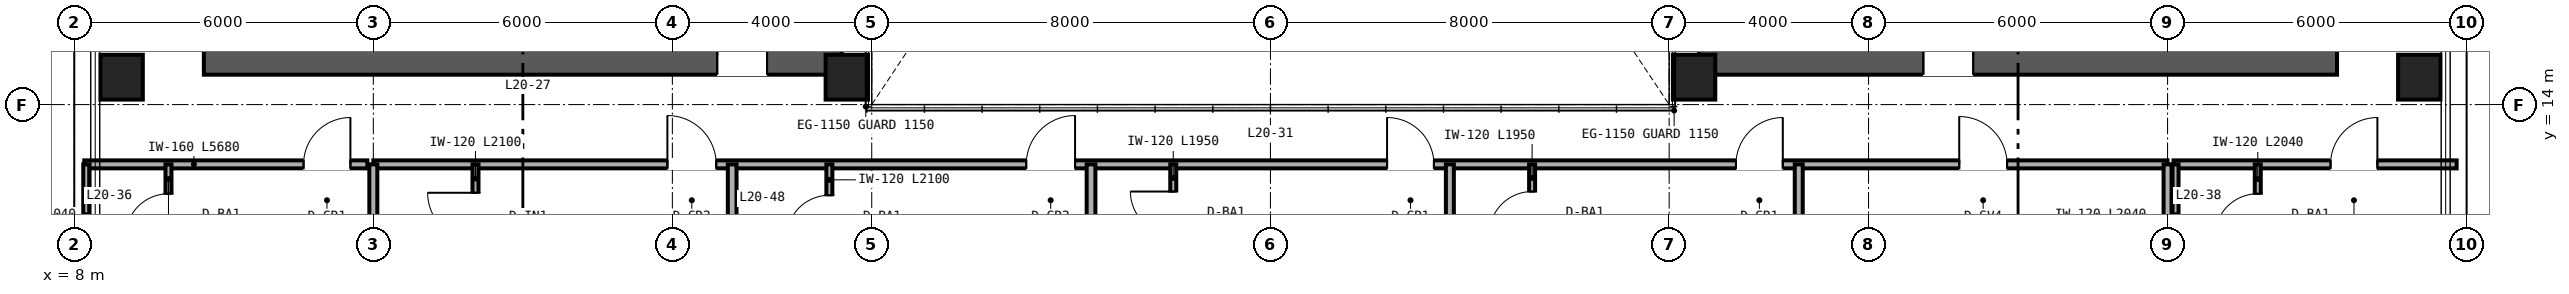
"""IFC4 building model, lengths in metres.
Left out: names, types, materials, properties, quantities, classifications, styles, units other than length and angle.
Written with IfcOpenShell. Run it as: python <this file> out.ifc"""

import sys

from ifc_helpers import new_model, si_unit, direction, frame, frame_2d, origin, origin_2d, place, context, subcontext, project, spatial, rectangle, hollow_rectangle, extrude, source, transform, mapped, element, fill, save


model = new_model("IFC4")
c1 = context("Model", 3, precision=1e-05, world=origin(), true_north=direction((0.0, 1.0)))
c2 = subcontext(c1, "Body", "Model", "MODEL_VIEW")
j1 = project(units=[si_unit("LENGTHUNIT", "METRE"), si_unit("PLANEANGLEUNIT", "RADIAN")], contexts=[c1])
p1 = place(None, origin())
s1 = spatial("IfcSite", under=j1, at=p1, CompositionType="ELEMENT")
p2 = place(p1, origin())
s2 = spatial("IfcBuilding", under=s1, at=p2, CompositionType="ELEMENT")
p3 = place(p2, frame((0.0, 0.0, 81.6)))
s3 = spatial("IfcBuildingStorey", under=s2, at=p3, CompositionType="ELEMENT", Elevation=81.6)
p4 = place(p3, frame((10.6, 15.0, 0.0), z_axis=(0.0, 0.0, 1.0), x_axis=(1.0, 0.0, 0.0)))
e1 = element("IfcWall", 1, at=p4, inside=s3, PredefinedType="SHEAR", context=c2, shape_type="SweptSolid", body=[
    extrude(rectangle(XDim=12.8, YDim=0.8, at=frame_2d((6.4, 0.0))), origin(), (0.0, 0.0, 1.0), 3.28),
])
p5 = place(p4, frame((10.3, 0.0, 0.0)))
e2 = element("IfcOpeningElement", 2, at=p5, cuts=e1, PredefinedType="OPENING", context=c2, shape_type="SweptSolid", body=[
    extrude(rectangle(XDim=1.0, YDim=2.15, at=frame_2d((0.5, 1.075))), frame((0.0, 0.41, 0.0), z_axis=(0.0, -1.0, 0.0), x_axis=(1.0, 0.0, 0.0)), (0.0, 0.0, 1.0), 0.82),
])
p6 = place(p3, frame((40.6, 15.0, 0.0), z_axis=(0.0, 0.0, 1.0), x_axis=(1.0, 0.0, 0.0)))
e3 = element("IfcWall", 3, at=p6, inside=s3, PredefinedType="SHEAR", context=c2, shape_type="SweptSolid", body=[
    extrude(rectangle(XDim=12.8, YDim=0.8, at=frame_2d((6.4, 0.0))), origin(), (0.0, 0.0, 1.0), 3.28),
])
p7 = place(p6, frame((4.5, 0.0, 0.0)))
e4 = element("IfcOpeningElement", 4, at=p7, cuts=e3, PredefinedType="OPENING", context=c2, shape_type="SweptSolid", body=[
    extrude(rectangle(XDim=1.0, YDim=2.15, at=frame_2d((0.5, 1.075))), frame((0.0, 0.41, 0.0), z_axis=(0.0, -1.0, 0.0), x_axis=(1.0, 0.0, 0.0)), (0.0, 0.0, 1.0), 0.82),
])
m1 = source(origin(), c2, "Body", "SweptSolid", [
    extrude(hollow_rectangle(XDim=0.85, YDim=0.9, WallThickness=0.04, at=origin_2d()), origin(), (0.0, 0.0, 1.0), 3.28),
])
for number, where, z_axis, x_axis in (
    (5, (8.95, 14.55, 0.0), (0.0, 0.0, 1.0), (1.0, 0.0, 0.0)),
    (6, (23.5, 14.55, 0.0), (0.0, 0.0, 1.0), (1.0, 0.0, 0.0)),
    (7, (40.5, 14.55, 0.0), (0.0, 0.0, 1.0), (1.0, 0.0, 0.0)),
    (8, (55.05, 14.55, 0.0), (0.0, 0.0, 1.0), (1.0, 0.0, 0.0)),
):
    element("IfcColumn", number, at=place(p3, frame(where, z_axis=z_axis, x_axis=x_axis)), inside=s3, PredefinedType="COLUMN", context=c2, shape_type="MappedRepresentation", body=[
        mapped(m1, transform((0.0, 0.0, 0.0), scale=1.0)),
    ])
p8 = place(p3, frame((8.2, 12.8, 0.0), z_axis=(0.0, 0.0, 1.0), x_axis=(1.0, 0.0, 0.0)))
e9 = element("IfcWall", 9, at=p8, inside=s3, PredefinedType="PARTITIONING", context=c2, shape_type="SweptSolid", body=[
    extrude(rectangle(XDim=5.68, YDim=0.16, at=frame_2d((2.84, 0.0))), origin(), (0.0, 0.0, 1.0), 3.28),
])
p9 = place(p8, frame((4.4, 0.0, 0.0)))
e10 = element("IfcOpeningElement", 10, at=p9, cuts=e9, PredefinedType="OPENING", context=c2, shape_type="SweptSolid", body=[
    extrude(rectangle(XDim=0.94, YDim=2.15, at=frame_2d((0.47, 1.075))), frame((0.0, 0.09, 0.0), z_axis=(0.0, -1.0, 0.0), x_axis=(1.0, 0.0, 0.0)), (0.0, 0.0, 1.0), 0.18),
])
p10 = place(p3, frame((9.89, 10.76, 0.0), z_axis=(0.0, 0.0, 1.0), x_axis=(0.0, 1.0, 0.0)))
e11 = element("IfcWall", 11, at=p10, inside=s3, PredefinedType="PARTITIONING", context=c2, shape_type="SweptSolid", body=[
    extrude(rectangle(XDim=2.04, YDim=0.12, at=frame_2d((1.02, 0.0))), origin(), (0.0, 0.0, 1.0), 3.28),
])
p11 = place(p10, frame((0.59, 0.0, 0.0)))
e12 = element("IfcOpeningElement", 12, at=p11, cuts=e11, PredefinedType="OPENING", context=c2, shape_type="SweptSolid", body=[
    extrude(rectangle(XDim=0.86, YDim=2.1, at=frame_2d((0.43, 1.05))), frame((0.0, 0.07, 0.0), z_axis=(0.0, -1.0, 0.0), x_axis=(1.0, 0.0, 0.0)), (0.0, 0.0, 1.0), 0.14),
])
p12 = place(p3, frame((8.24, 10.76, 0.0), z_axis=(0.0, 0.0, 1.0), x_axis=(0.0, 1.0, 0.0)))
e13 = element("IfcWall", 13, at=p12, inside=s3, PredefinedType="PARTITIONING", context=c2, shape_type="SweptSolid", body=[
    extrude(rectangle(XDim=2.04, YDim=0.12, at=frame_2d((1.02, 0.0))), origin(), (0.0, 0.0, 1.0), 3.28),
])
p13 = place(p3, frame((50.12, 12.8, 0.0), z_axis=(0.0, 0.0, 1.0), x_axis=(1.0, 0.0, 0.0)))
e14 = element("IfcWall", 14, at=p13, inside=s3, PredefinedType="PARTITIONING", context=c2, shape_type="SweptSolid", body=[
    extrude(rectangle(XDim=5.68, YDim=0.16, at=frame_2d((2.84, 0.0))), origin(), (0.0, 0.0, 1.0), 3.28),
])
p14 = place(p13, frame((3.15, 0.0, 0.0)))
e15 = element("IfcOpeningElement", 15, at=p14, cuts=e14, PredefinedType="OPENING", context=c2, shape_type="SweptSolid", body=[
    extrude(rectangle(XDim=0.94, YDim=2.15, at=frame_2d((0.47, 1.075))), frame((0.0, 0.09, 0.0), z_axis=(0.0, -1.0, 0.0), x_axis=(1.0, 0.0, 0.0)), (0.0, 0.0, 1.0), 0.18),
])
p15 = place(p3, frame((51.81, 10.76, 0.0), z_axis=(0.0, 0.0, 1.0), x_axis=(0.0, 1.0, 0.0)))
e16 = element("IfcWall", 16, at=p15, inside=s3, PredefinedType="PARTITIONING", context=c2, shape_type="SweptSolid", body=[
    extrude(rectangle(XDim=2.04, YDim=0.12, at=frame_2d((1.02, 0.0))), origin(), (0.0, 0.0, 1.0), 3.28),
])
p16 = place(p15, frame((0.59, 0.0, 0.0)))
e17 = element("IfcOpeningElement", 17, at=p16, cuts=e16, PredefinedType="OPENING", context=c2, shape_type="SweptSolid", body=[
    extrude(rectangle(XDim=0.86, YDim=2.1, at=frame_2d((0.43, 1.05))), frame((0.0, 0.07, 0.0), z_axis=(0.0, -1.0, 0.0), x_axis=(1.0, 0.0, 0.0)), (0.0, 0.0, 1.0), 0.14),
])
p17 = place(p3, frame((50.16, 10.76, 0.0), z_axis=(0.0, 0.0, 1.0), x_axis=(0.0, 1.0, 0.0)))
e18 = element("IfcWall", 18, at=p17, inside=s3, PredefinedType="PARTITIONING", context=c2, shape_type="SweptSolid", body=[
    extrude(rectangle(XDim=2.04, YDim=0.12, at=frame_2d((1.02, 0.0))), origin(), (0.0, 0.0, 1.0), 3.28),
])
p18 = place(p3, frame((14.0, 12.8, 0.0), z_axis=(0.0, 0.0, 1.0), x_axis=(1.0, 0.0, 0.0)))
e19 = element("IfcWall", 19, at=p18, inside=s3, PredefinedType="PARTITIONING", context=c2, shape_type="SweptSolid", body=[
    extrude(rectangle(XDim=36.0, YDim=0.16, at=frame_2d((18.0, 0.0))), origin(), (0.0, 0.0, 1.0), 2.501),
])
p19 = place(p18, frame((5.9, 0.0, 0.0)))
e20 = element("IfcOpeningElement", 20, at=p19, cuts=e19, PredefinedType="OPENING", context=c2, shape_type="SweptSolid", body=[
    extrude(rectangle(XDim=0.98, YDim=2.2, at=frame_2d((0.49, 1.1))), frame((0.0, 0.09, 0.0), z_axis=(0.0, -1.0, 0.0), x_axis=(1.0, 0.0, 0.0)), (0.0, 0.0, 1.0), 0.18),
])
p20 = place(p18, frame((13.1, 0.0, 0.0)))
e21 = element("IfcOpeningElement", 21, at=p20, cuts=e19, PredefinedType="OPENING", context=c2, shape_type="SweptSolid", body=[
    extrude(rectangle(XDim=0.98, YDim=2.2, at=frame_2d((0.49, 1.1))), frame((0.0, 0.09, 0.0), z_axis=(0.0, -1.0, 0.0), x_axis=(1.0, 0.0, 0.0)), (0.0, 0.0, 1.0), 0.18),
])
p21 = place(p18, frame((20.34, 0.0, 0.0)))
e22 = element("IfcOpeningElement", 22, at=p21, cuts=e19, PredefinedType="OPENING", context=c2, shape_type="SweptSolid", body=[
    extrude(rectangle(XDim=0.94, YDim=2.15, at=frame_2d((0.47, 1.075))), frame((0.0, 0.09, 0.0), z_axis=(0.0, -1.0, 0.0), x_axis=(1.0, 0.0, 0.0)), (0.0, 0.0, 1.0), 0.18),
])
p22 = place(p18, frame((27.34, 0.0, 0.0)))
e23 = element("IfcOpeningElement", 23, at=p22, cuts=e19, PredefinedType="OPENING", context=c2, shape_type="SweptSolid", body=[
    extrude(rectangle(XDim=0.94, YDim=2.15, at=frame_2d((0.47, 1.075))), frame((0.0, 0.09, 0.0), z_axis=(0.0, -1.0, 0.0), x_axis=(1.0, 0.0, 0.0)), (0.0, 0.0, 1.0), 0.18),
])
p23 = place(p18, frame((31.82, 0.0, 0.0)))
e24 = element("IfcOpeningElement", 24, at=p23, cuts=e19, PredefinedType="OPENING", context=c2, shape_type="SweptSolid", body=[
    extrude(rectangle(XDim=0.96, YDim=2.15, at=frame_2d((0.48, 1.075))), frame((0.0, 0.09, 0.0), z_axis=(0.0, -1.0, 0.0), x_axis=(1.0, 0.0, 0.0)), (0.0, 0.0, 1.0), 0.18),
])
for number, where, z_axis, x_axis in (
    (25, (14.0, 2.36, 0.0), (0.0, 0.0, 1.0), (0.0, 1.0, 0.0)),
    (26, (50.0, 2.36, 0.0), (0.0, 0.0, 1.0), (0.0, 1.0, 0.0)),
):
    element("IfcWall", number, at=place(p3, frame(where, z_axis=z_axis, x_axis=x_axis)), inside=s3, PredefinedType="PARTITIONING", context=c2, shape_type="SweptSolid", body=[
        extrude(rectangle(XDim=10.44, YDim=0.16, at=frame_2d((5.22, 0.0))), origin(), (0.0, 0.0, 1.0), 2.587),
    ])
p24 = place(p3, frame((21.2, 2.36, 0.0), z_axis=(0.0, 0.0, 1.0), x_axis=(0.0, 1.0, 0.0)))
e27 = element("IfcWall", 27, at=p24, inside=s3, PredefinedType="PARTITIONING", context=c2, shape_type="SweptSolid", body=[
    extrude(rectangle(XDim=10.44, YDim=0.175, at=frame_2d((5.22, 0.0))), origin(), (0.0, 0.0, 1.0), 2.743),
])
p25 = place(p3, frame((16.05, 10.7, 0.0), z_axis=(0.0, 0.0, 1.0), x_axis=(0.0, 1.0, 0.0)))
e28 = element("IfcWall", 28, at=p25, inside=s3, PredefinedType="PARTITIONING", context=c2, shape_type="SweptSolid", body=[
    extrude(rectangle(XDim=2.1, YDim=0.12, at=frame_2d((1.05, 0.0))), origin(), (0.0, 0.0, 1.0), 3.28),
])
p26 = place(p25, frame((0.57, 0.0, 0.0)))
e29 = element("IfcOpeningElement", 29, at=p26, cuts=e28, PredefinedType="OPENING", context=c2, shape_type="SweptSolid", body=[
    extrude(rectangle(XDim=0.96, YDim=2.15, at=frame_2d((0.48, 1.075))), frame((0.0, 0.07, 0.0), z_axis=(0.0, -1.0, 0.0), x_axis=(1.0, 0.0, 0.0)), (0.0, 0.0, 1.0), 0.14),
])
p27 = place(p3, frame((28.4, 2.36, 0.0), z_axis=(0.0, 0.0, 1.0), x_axis=(0.0, 1.0, 0.0)))
e30 = element("IfcWall", 30, at=p27, inside=s3, PredefinedType="PARTITIONING", context=c2, shape_type="SweptSolid", body=[
    extrude(rectangle(XDim=10.44, YDim=0.175, at=frame_2d((5.22, 0.0))), origin(), (0.0, 0.0, 1.0), 2.36),
])
p28 = place(p3, frame((23.15, 10.7, 0.0), z_axis=(0.0, 0.0, 1.0), x_axis=(0.0, 1.0, 0.0)))
e31 = element("IfcWall", 31, at=p28, inside=s3, PredefinedType="PARTITIONING", context=c2, shape_type="SweptSolid", body=[
    extrude(rectangle(XDim=2.1, YDim=0.12, at=frame_2d((1.05, 0.0))), origin(), (0.0, 0.0, 1.0), 3.28),
])
p29 = place(p28, frame((0.62, 0.0, 0.0)))
e32 = element("IfcOpeningElement", 32, at=p29, cuts=e31, PredefinedType="OPENING", context=c2, shape_type="SweptSolid", body=[
    extrude(rectangle(XDim=0.86, YDim=2.1, at=frame_2d((0.43, 1.05))), frame((0.0, 0.07, 0.0), z_axis=(0.0, -1.0, 0.0), x_axis=(1.0, 0.0, 0.0)), (0.0, 0.0, 1.0), 0.14),
])
p30 = place(p3, frame((35.6, 2.36, 0.0), z_axis=(0.0, 0.0, 1.0), x_axis=(0.0, 1.0, 0.0)))
e33 = element("IfcWall", 33, at=p30, inside=s3, PredefinedType="PARTITIONING", context=c2, shape_type="SweptSolid", body=[
    extrude(rectangle(XDim=10.44, YDim=0.16, at=frame_2d((5.22, 0.0))), origin(), (0.0, 0.0, 1.0), 2.36),
])
p31 = place(p3, frame((30.05, 10.85, 0.0), z_axis=(0.0, 0.0, 1.0), x_axis=(0.0, 1.0, 0.0)))
e34 = element("IfcWall", 34, at=p31, inside=s3, PredefinedType="PARTITIONING", context=c2, shape_type="SweptSolid", body=[
    extrude(rectangle(XDim=1.95, YDim=0.12, at=frame_2d((0.975, 0.0))), origin(), (0.0, 0.0, 1.0), 3.28),
])
p32 = place(p31, frame((0.545, 0.0, 0.0)))
e35 = element("IfcOpeningElement", 35, at=p32, cuts=e34, PredefinedType="OPENING", context=c2, shape_type="SweptSolid", body=[
    extrude(rectangle(XDim=0.86, YDim=2.1, at=frame_2d((0.43, 1.05))), frame((0.0, 0.07, 0.0), z_axis=(0.0, -1.0, 0.0), x_axis=(1.0, 0.0, 0.0)), (0.0, 0.0, 1.0), 0.14),
])
p33 = place(p3, frame((42.6, 2.36, 0.0), z_axis=(0.0, 0.0, 1.0), x_axis=(0.0, 1.0, 0.0)))
e36 = element("IfcWall", 36, at=p33, inside=s3, PredefinedType="PARTITIONING", context=c2, shape_type="SweptSolid", body=[
    extrude(rectangle(XDim=10.44, YDim=0.16, at=frame_2d((5.22, 0.0))), origin(), (0.0, 0.0, 1.0), 2.743),
])
p34 = place(p3, frame((37.25, 10.85, 0.0), z_axis=(0.0, 0.0, 1.0), x_axis=(0.0, 1.0, 0.0)))
e37 = element("IfcWall", 37, at=p34, inside=s3, PredefinedType="PARTITIONING", context=c2, shape_type="SweptSolid", body=[
    extrude(rectangle(XDim=1.95, YDim=0.12, at=frame_2d((0.975, 0.0))), origin(), (0.0, 0.0, 1.0), 3.28),
])
p35 = place(p34, frame((0.545, 0.0, 0.0)))
e38 = element("IfcOpeningElement", 38, at=p35, cuts=e37, PredefinedType="OPENING", context=c2, shape_type="SweptSolid", body=[
    extrude(rectangle(XDim=0.86, YDim=2.1, at=frame_2d((0.43, 1.05))), frame((0.0, 0.07, 0.0), z_axis=(0.0, -1.0, 0.0), x_axis=(1.0, 0.0, 0.0)), (0.0, 0.0, 1.0), 0.14),
])
m2 = source(origin(), c2, "Body", "SweptSolid", [
    extrude(rectangle(XDim=1.0, YDim=2.15, at=frame_2d((0.5, 1.075))), frame((0.0, 0.025, 0.0), z_axis=(0.0, -1.0, 0.0), x_axis=(1.0, 0.0, 0.0)), (0.0, 0.0, 1.0), 0.05),
])
p36 = place(p5, origin())
e39 = element("IfcDoor", 39, at=p36, inside=s3, OperationType="SINGLE_SWING_LEFT", PredefinedType="DOOR", context=c2, shape_type="MappedRepresentation", body=[
    mapped(m2, transform((0.0, 0.0, 0.0), scale=1.0)),
])
fill(e2, e39)
p37 = place(p7, origin())
e40 = element("IfcDoor", 40, at=p37, inside=s3, OperationType="SINGLE_SWING_RIGHT", PredefinedType="DOOR", context=c2, shape_type="MappedRepresentation", body=[
    mapped(m2, transform((0.0, 0.0, 0.0), scale=1.0)),
])
fill(e4, e40)
m3 = source(origin(), c2, "Body", "SweptSolid", [
    extrude(rectangle(XDim=0.86, YDim=2.1, at=frame_2d((0.43, 1.05))), frame((0.0, 0.025, 0.0), z_axis=(0.0, -1.0, 0.0), x_axis=(1.0, 0.0, 0.0)), (0.0, 0.0, 1.0), 0.05),
])
p38 = place(p11, origin())
e41 = element("IfcDoor", 41, at=p38, inside=s3, OperationType="SINGLE_SWING_LEFT", PredefinedType="DOOR", context=c2, shape_type="MappedRepresentation", body=[
    mapped(m3, transform((0.0, 0.0, 0.0), scale=1.0)),
])
fill(e12, e41)
m4 = source(origin(), c2, "Body", "SweptSolid", [
    extrude(rectangle(XDim=0.94, YDim=2.15, at=frame_2d((0.47, 1.075))), frame((0.0, 0.025, 0.0), z_axis=(0.0, -1.0, 0.0), x_axis=(1.0, 0.0, 0.0)), (0.0, 0.0, 1.0), 0.05),
])
p39 = place(p9, origin())
e42 = element("IfcDoor", 42, at=p39, inside=s3, OperationType="SINGLE_SWING_RIGHT", PredefinedType="DOOR", context=c2, shape_type="MappedRepresentation", body=[
    mapped(m4, transform((0.0, 0.0, 0.0), scale=1.0)),
])
fill(e10, e42)
p40 = place(p16, origin())
e43 = element("IfcDoor", 43, at=p40, inside=s3, OperationType="SINGLE_SWING_LEFT", PredefinedType="DOOR", context=c2, shape_type="MappedRepresentation", body=[
    mapped(m3, transform((0.0, 0.0, 0.0), scale=1.0)),
])
fill(e17, e43)
p41 = place(p14, origin())
e44 = element("IfcDoor", 44, at=p41, inside=s3, OperationType="SINGLE_SWING_RIGHT", PredefinedType="DOOR", context=c2, shape_type="MappedRepresentation", body=[
    mapped(m4, transform((0.0, 0.0, 0.0), scale=1.0)),
])
fill(e15, e44)
m5 = source(origin(), c2, "Body", "SweptSolid", [
    extrude(rectangle(XDim=0.96, YDim=2.15, at=frame_2d((0.48, 1.075))), frame((0.0, 0.025, 0.0), z_axis=(0.0, -1.0, 0.0), x_axis=(1.0, 0.0, 0.0)), (0.0, 0.0, 1.0), 0.05),
])
p42 = place(p26, origin())
e45 = element("IfcDoor", 45, at=p42, inside=s3, OperationType="SINGLE_SWING_RIGHT", PredefinedType="DOOR", context=c2, shape_type="MappedRepresentation", body=[
    mapped(m5, transform((0.0, 0.0, 0.0), scale=1.0)),
])
fill(e29, e45)
p43 = place(p29, origin())
e46 = element("IfcDoor", 46, at=p43, inside=s3, OperationType="SINGLE_SWING_LEFT", PredefinedType="DOOR", context=c2, shape_type="MappedRepresentation", body=[
    mapped(m3, transform((0.0, 0.0, 0.0), scale=1.0)),
])
fill(e32, e46)
p44 = place(p32, origin())
e47 = element("IfcDoor", 47, at=p44, inside=s3, OperationType="SINGLE_SWING_RIGHT", PredefinedType="DOOR", context=c2, shape_type="MappedRepresentation", body=[
    mapped(m3, transform((0.0, 0.0, 0.0), scale=1.0)),
])
fill(e35, e47)
p45 = place(p35, origin())
e48 = element("IfcDoor", 48, at=p45, inside=s3, OperationType="SINGLE_SWING_LEFT", PredefinedType="DOOR", context=c2, shape_type="MappedRepresentation", body=[
    mapped(m3, transform((0.0, 0.0, 0.0), scale=1.0)),
])
fill(e38, e48)
m6 = source(origin(), c2, "Body", "SweptSolid", [
    extrude(rectangle(XDim=0.98, YDim=2.2, at=frame_2d((0.49, 1.1))), frame((0.0, 0.025, 0.0), z_axis=(0.0, -1.0, 0.0), x_axis=(1.0, 0.0, 0.0)), (0.0, 0.0, 1.0), 0.05),
])
p46 = place(p19, origin())
e49 = element("IfcDoor", 49, at=p46, inside=s3, OperationType="SINGLE_SWING_LEFT", PredefinedType="DOOR", context=c2, shape_type="MappedRepresentation", body=[
    mapped(m6, transform((0.0, 0.0, 0.0), scale=1.0)),
])
fill(e20, e49)
p47 = place(p20, origin())
e50 = element("IfcDoor", 50, at=p47, inside=s3, OperationType="SINGLE_SWING_RIGHT", PredefinedType="DOOR", context=c2, shape_type="MappedRepresentation", body=[
    mapped(m6, transform((0.0, 0.0, 0.0), scale=1.0)),
])
fill(e21, e50)
p48 = place(p21, origin())
e51 = element("IfcDoor", 51, at=p48, inside=s3, OperationType="SINGLE_SWING_LEFT", PredefinedType="DOOR", context=c2, shape_type="MappedRepresentation", body=[
    mapped(m4, transform((0.0, 0.0, 0.0), scale=1.0)),
])
fill(e22, e51)
p49 = place(p22, origin())
e52 = element("IfcDoor", 52, at=p49, inside=s3, OperationType="SINGLE_SWING_RIGHT", PredefinedType="DOOR", context=c2, shape_type="MappedRepresentation", body=[
    mapped(m4, transform((0.0, 0.0, 0.0), scale=1.0)),
])
fill(e23, e52)
p50 = place(p23, origin())
e53 = element("IfcDoor", 53, at=p50, inside=s3, OperationType="SINGLE_SWING_LEFT", PredefinedType="DOOR", context=c2, shape_type="MappedRepresentation", body=[
    mapped(m5, transform((0.0, 0.0, 0.0), scale=1.0)),
])
fill(e24, e53)
save(model, sys.argv[1])
